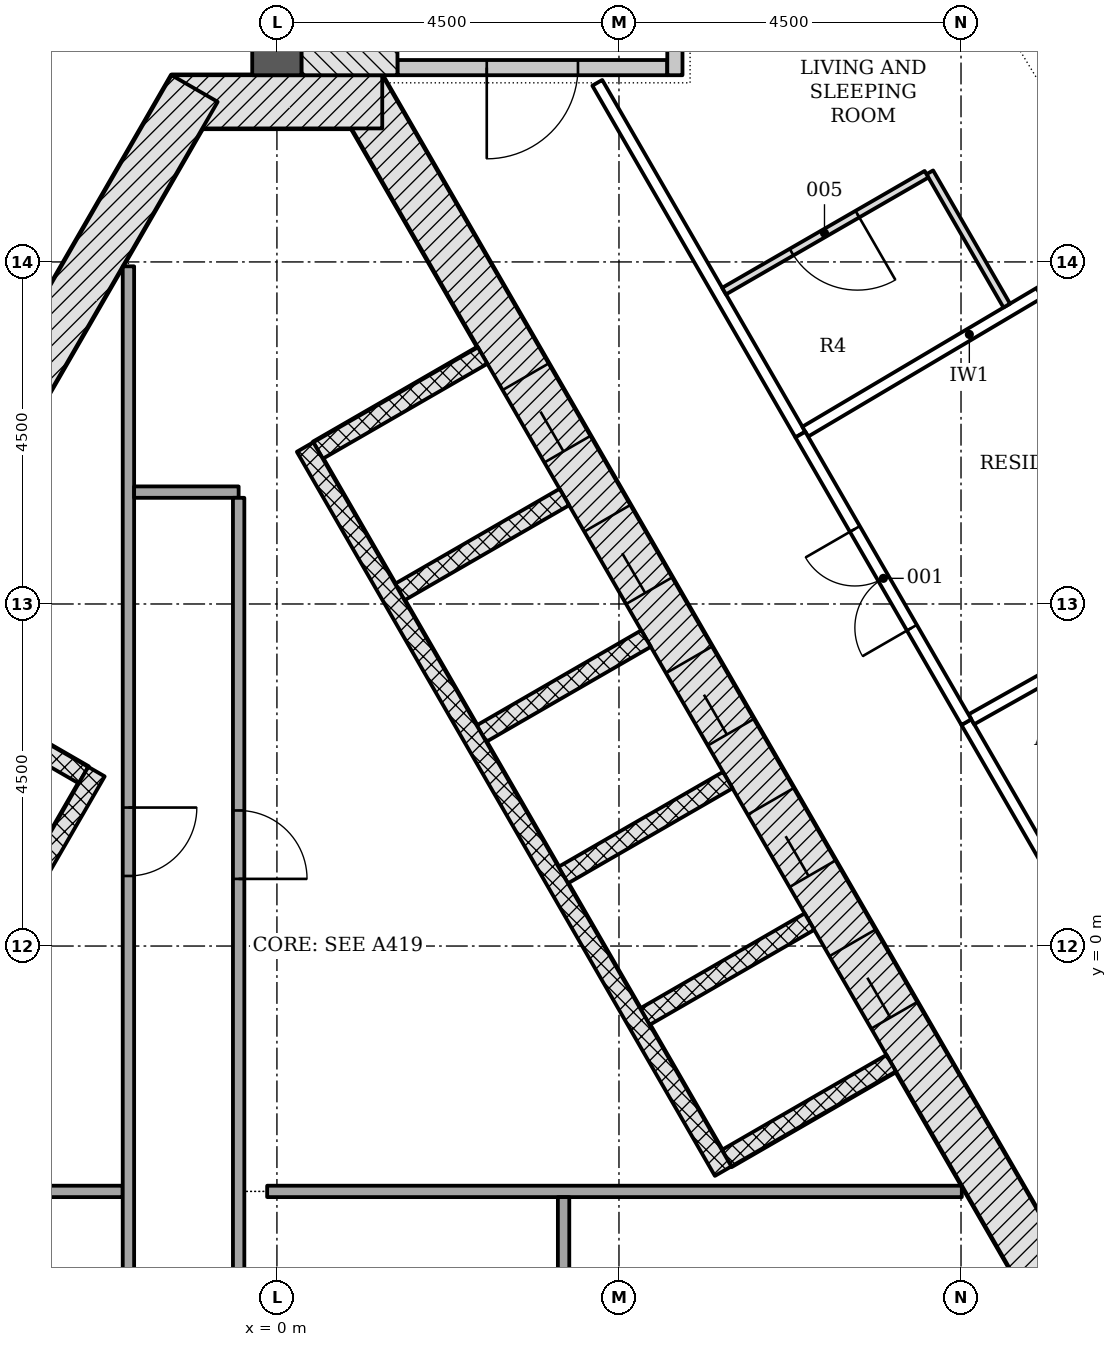
"""IFC4 building model, lengths in metres.
Left out: names, types, materials, properties, quantities, classifications, styles, units other than length and angle.
Written with IfcOpenShell. Run it as: python <this file> out.ifc"""

import sys

from ifc_helpers import new_model, si_unit, direction, frame, frame_2d, origin, place, context, subcontext, project, spatial, rectangle, extrude, element, fill, save


model = new_model("IFC4")
c1 = context("Model", 3, precision=1e-05, world=origin(), true_north=direction((0.0, 1.0)))
c2 = subcontext(c1, "Body", "Model", "MODEL_VIEW")
j1 = project(units=[si_unit("LENGTHUNIT", "METRE"), si_unit("PLANEANGLEUNIT", "RADIAN")], contexts=[c1])
p1 = place(None, origin())
s1 = spatial("IfcSite", under=j1, at=p1, CompositionType="ELEMENT")
p2 = place(p1, origin())
s2 = spatial("IfcBuilding", under=s1, at=p2, CompositionType="ELEMENT")
p3 = place(p2, frame((0.0, 0.0, 229.2)))
s3 = spatial("IfcBuildingStorey", under=s2, at=p3, CompositionType="ELEMENT", Elevation=229.2)
p4 = place(p3, frame((8.926, -6.753, -0.2), z_axis=(0.0, 0.0, 1.0), x_axis=(0.500042739161, 0.866000726912, 0.0)))
e1 = element("IfcWall", 1, at=p4, inside=s3, PredefinedType="SHEAR", context=c2, shape_type="SweptSolid", body=[
    extrude(rectangle(XDim=2.771, YDim=0.7, at=frame_2d((1.386, 0.0))), origin(), (0.0, 0.0, 1.0), 3.6),
])
p5 = place(p3, frame((10.311, -4.703, -0.2), z_axis=(0.0, 0.0, 1.0), x_axis=(-0.500001446645, 0.866024568562, 0.0)))
e2 = element("IfcWall", 2, at=p5, inside=s3, PredefinedType="SHEAR", context=c2, shape_type="SweptSolid", body=[
    extrude(rectangle(XDim=18.458, YDim=0.7, at=frame_2d((9.229, 0.0))), origin(), (0.0, 0.0, 1.0), 3.6),
])
p6 = place(p5, frame((4.379, 0.0, 0.2)))
e3 = element("IfcOpeningElement", 3, at=p6, cuts=e2, PredefinedType="OPENING", context=c2, shape_type="SweptSolid", body=[
    extrude(rectangle(XDim=1.1, YDim=2.1, at=frame_2d((0.55, 1.05))), frame((0.0, 0.36, 0.0), z_axis=(0.0, -1.0, 0.0), x_axis=(1.0, 0.0, 0.0)), (0.0, 0.0, 1.0), 0.72),
])
p7 = place(p5, frame((6.529, 0.0, 0.2)))
e4 = element("IfcOpeningElement", 4, at=p7, cuts=e2, PredefinedType="OPENING", context=c2, shape_type="SweptSolid", body=[
    extrude(rectangle(XDim=1.1, YDim=2.1, at=frame_2d((0.55, 1.05))), frame((0.0, 0.36, 0.0), z_axis=(0.0, -1.0, 0.0), x_axis=(1.0, 0.0, 0.0)), (0.0, 0.0, 1.0), 0.72),
])
p8 = place(p5, frame((8.679, 0.0, 0.2)))
e5 = element("IfcOpeningElement", 5, at=p8, cuts=e2, PredefinedType="OPENING", context=c2, shape_type="SweptSolid", body=[
    extrude(rectangle(XDim=1.1, YDim=2.1, at=frame_2d((0.55, 1.05))), frame((0.0, 0.36, 0.0), z_axis=(0.0, -1.0, 0.0), x_axis=(1.0, 0.0, 0.0)), (0.0, 0.0, 1.0), 0.72),
])
p9 = place(p5, frame((10.829, 0.0, 0.2)))
e6 = element("IfcOpeningElement", 6, at=p9, cuts=e2, PredefinedType="OPENING", context=c2, shape_type="SweptSolid", body=[
    extrude(rectangle(XDim=1.1, YDim=2.1, at=frame_2d((0.55, 1.05))), frame((0.0, 0.36, 0.0), z_axis=(0.0, -1.0, 0.0), x_axis=(1.0, 0.0, 0.0)), (0.0, 0.0, 1.0), 0.72),
])
p10 = place(p5, frame((12.979, 0.0, 0.2)))
e7 = element("IfcOpeningElement", 7, at=p10, cuts=e2, PredefinedType="OPENING", context=c2, shape_type="SweptSolid", body=[
    extrude(rectangle(XDim=1.1, YDim=2.1, at=frame_2d((0.55, 1.05))), frame((0.0, 0.36, 0.0), z_axis=(0.0, -1.0, 0.0), x_axis=(1.0, 0.0, 0.0)), (0.0, 0.0, 1.0), 0.72),
])
p11 = place(p3, frame((1.386, 11.106, -0.2), z_axis=(0.0, 0.0, 1.0), x_axis=(-1.0, 0.0, 0.0)))
e8 = element("IfcWall", 8, at=p11, inside=s3, PredefinedType="SHEAR", context=c2, shape_type="SweptSolid", body=[
    extrude(rectangle(XDim=2.771, YDim=0.7, at=frame_2d((1.386, 0.0))), origin(), (0.0, 0.0, 1.0), 3.6),
])
p12 = place(p3, frame((-1.083, 11.281, -0.2), z_axis=(0.0, 0.0, 1.0), x_axis=(-0.500001446645, -0.866024568562, 0.0)))
e9 = element("IfcWall", 9, at=p12, inside=s3, PredefinedType="SHEAR", context=c2, shape_type="SweptSolid", body=[
    extrude(rectangle(XDim=18.458, YDim=0.7, at=frame_2d((9.229, 0.0))), origin(), (0.0, 0.0, 1.0), 3.6),
])
p13 = place(p12, frame((8.979, 0.0, 0.2)))
e10 = element("IfcOpeningElement", 10, at=p13, cuts=e9, PredefinedType="OPENING", context=c2, shape_type="SweptSolid", body=[
    extrude(rectangle(XDim=1.2, YDim=2.1, at=frame_2d((0.6, 1.05))), frame((0.0, 0.36, 0.0), z_axis=(0.0, -1.0, 0.0), x_axis=(1.0, 0.0, 0.0)), (0.0, 0.0, 1.0), 0.72),
])
p14 = place(p12, frame((11.029, 0.0, 0.2)))
e11 = element("IfcOpeningElement", 11, at=p14, cuts=e9, PredefinedType="OPENING", context=c2, shape_type="SweptSolid", body=[
    extrude(rectangle(XDim=1.2, YDim=2.1, at=frame_2d((0.6, 1.05))), frame((0.0, 0.36, 0.0), z_axis=(0.0, -1.0, 0.0), x_axis=(1.0, 0.0, 0.0)), (0.0, 0.0, 1.0), 0.72),
])
p15 = place(p3, frame((0.0, 11.456, -0.2), z_axis=(0.0, 0.0, 1.0), x_axis=(0.0, 1.0, 0.0)))
e12 = element("IfcWall", 12, at=p15, inside=s3, PredefinedType="SHEAR", context=c2, shape_type="SweptSolid", body=[
    extrude(rectangle(XDim=7.507, YDim=0.65, at=frame_2d((3.753, 0.0))), origin(), (0.0, 0.0, 1.0), 3.6),
])
for number, where, z_axis, x_axis in (
    (13, (8.081, -1.541, -0.2), (0.0, 0.0, 1.0), (-0.866, -0.5, 0.0)),
    (14, (7.006, 0.321, -0.2), (0.0, 0.0, 1.0), (-0.866, -0.5, 0.0)),
):
    element("IfcWall", number, at=place(p3, frame(where, z_axis=z_axis, x_axis=x_axis)), inside=s3, PredefinedType="PARTITIONING", context=c2, shape_type="SweptSolid", body=[
        extrude(rectangle(XDim=2.5, YDim=0.25, at=frame_2d((1.25, 0.0))), origin(), (0.0, 0.0, 1.0), 3.6),
    ])
p16 = place(p3, frame((5.931, 2.183, -0.2), z_axis=(0.0, 0.0, 1.0), x_axis=(-0.866047370643, -0.499961950354, 0.0)))
e15 = element("IfcWall", 15, at=p16, inside=s3, PredefinedType="PARTITIONING", context=c2, shape_type="SweptSolid", body=[
    extrude(rectangle(XDim=2.5, YDim=0.25, at=frame_2d((1.25, 0.0))), origin(), (0.0, 0.0, 1.0), 3.6),
])
for number, where, z_axis, x_axis in (
    (16, (4.856, 4.045, -0.2), (0.0, 0.0, 1.0), (-0.866, -0.5, 0.0)),
    (17, (3.781, 5.907, -0.2), (0.0, 0.0, 1.0), (-0.866, -0.5, 0.0)),
    (18, (2.706, 7.769, -0.2), (0.0, 0.0, 1.0), (-0.866, -0.5, 0.0)),
):
    element("IfcWall", number, at=place(p3, frame(where, z_axis=z_axis, x_axis=x_axis)), inside=s3, PredefinedType="PARTITIONING", context=c2, shape_type="SweptSolid", body=[
        extrude(rectangle(XDim=2.5, YDim=0.25, at=frame_2d((1.25, 0.0))), origin(), (0.0, 0.0, 1.0), 3.6),
    ])
p17 = place(p3, frame((5.87, -2.961, 0.0), z_axis=(0.0, 0.0, 1.0), x_axis=(-0.50000615651, 0.866021849293, 0.0)))
e19 = element("IfcWall", 19, at=p17, inside=s3, PredefinedType="PARTITIONING", context=c2, shape_type="SweptSolid", body=[
    extrude(rectangle(XDim=11.0, YDim=0.25, at=frame_2d((5.5, 0.0))), origin(), (0.0, 0.0, 1.0), 3.4),
])
p18 = place(p3, frame((-5.056, 3.699, -0.2), z_axis=(0.0, 0.0, 1.0), x_axis=(0.866032775405, -0.499987231761, 0.0)))
e20 = element("IfcWall", 20, at=p18, inside=s3, PredefinedType="PARTITIONING", context=c2, shape_type="SweptSolid", body=[
    extrude(rectangle(XDim=2.9, YDim=0.25, at=frame_2d((1.45, 0.0))), origin(), (0.0, 0.0, 1.0), 3.6),
])
p19 = place(p3, frame((-2.374, 2.294, 0.0), z_axis=(0.0, 0.0, 1.0), x_axis=(-0.500003174267, -0.866023571113, 0.0)))
e21 = element("IfcWall", 21, at=p19, inside=s3, PredefinedType="PARTITIONING", context=c2, shape_type="SweptSolid", body=[
    extrude(rectangle(XDim=6.7, YDim=0.25, at=frame_2d((3.35, 0.0))), origin(), (0.0, 0.0, 1.0), 3.4),
])
p20 = place(p3, frame((-5.373, -3.228, 0.0), z_axis=(0.0, 0.0, 1.0), x_axis=(1.0, 0.0, 0.0)))
e22 = element("IfcWall", 22, at=p20, inside=s3, PredefinedType="PARTITIONING", context=c2, shape_type="SweptSolid", body=[
    extrude(rectangle(XDim=3.344, YDim=0.15, at=frame_2d((1.672, 0.0))), origin(), (0.0, 0.0, 1.0), 3.4),
])
p21 = place(p3, frame((-1.954, 8.942, 0.0), z_axis=(0.0, 0.0, 1.0), x_axis=(0.0, -1.0, 0.0)))
e23 = element("IfcWall", 23, at=p21, inside=s3, PredefinedType="PARTITIONING", context=c2, shape_type="SweptSolid", body=[
    extrude(rectangle(XDim=15.171, YDim=0.15, at=frame_2d((7.585, 0.0))), origin(), (0.0, 0.0, 1.0), 3.4),
])
p22 = place(p21, frame((7.121, 0.0, 0.0)))
e24 = element("IfcOpeningElement", 24, at=p22, cuts=e23, PredefinedType="OPENING", context=c2, shape_type="SweptSolid", body=[
    extrude(rectangle(XDim=0.9, YDim=2.1, at=frame_2d((0.45, 1.05))), frame((0.0, 0.085, 0.0), z_axis=(0.0, -1.0, 0.0), x_axis=(1.0, 0.0, 0.0)), (0.0, 0.0, 1.0), 0.17),
])
p23 = place(p3, frame((-1.879, 5.972, 0.0), z_axis=(0.0, 0.0, 1.0), x_axis=(1.0, 0.0, 0.0)))
e25 = element("IfcWall", 25, at=p23, inside=s3, PredefinedType="PARTITIONING", context=c2, shape_type="SweptSolid", body=[
    extrude(rectangle(XDim=1.375, YDim=0.15, at=frame_2d((0.688, 0.0))), origin(), (0.0, 0.0, 1.0), 3.4),
])
p24 = place(p3, frame((-0.504, 5.897, 0.0), z_axis=(0.0, 0.0, 1.0), x_axis=(0.0, -1.0, 0.0)))
e26 = element("IfcWall", 26, at=p24, inside=s3, PredefinedType="PARTITIONING", context=c2, shape_type="SweptSolid", body=[
    extrude(rectangle(XDim=12.125, YDim=0.15, at=frame_2d((6.062, 0.0))), origin(), (0.0, 0.0, 1.0), 3.4),
])
p25 = place(p24, frame((4.114, 0.0, 0.0)))
e27 = element("IfcOpeningElement", 27, at=p25, cuts=e26, PredefinedType="OPENING", context=c2, shape_type="SweptSolid", body=[
    extrude(rectangle(XDim=0.9, YDim=2.1, at=frame_2d((0.45, 1.05))), frame((0.0, 0.085, 0.0), z_axis=(0.0, -1.0, 0.0), x_axis=(1.0, 0.0, 0.0)), (0.0, 0.0, 1.0), 0.17),
])
p26 = place(p3, frame((-0.129, -3.228, 0.0), z_axis=(0.0, 0.0, 1.0), x_axis=(1.0, 0.0, 0.0)))
e28 = element("IfcWall", 28, at=p26, inside=s3, PredefinedType="PARTITIONING", context=c2, shape_type="SweptSolid", body=[
    extrude(rectangle(XDim=9.139, YDim=0.15, at=frame_2d((4.57, 0.0))), origin(), (0.0, 0.0, 1.0), 3.4),
])
p27 = place(p3, frame((3.771, -3.303, 0.0), z_axis=(0.0, 0.0, 1.0), x_axis=(0.0, -1.0, 0.0)))
e29 = element("IfcWall", 29, at=p27, inside=s3, PredefinedType="PARTITIONING", context=c2, shape_type="SweptSolid", body=[
    extrude(rectangle(XDim=2.925, YDim=0.15, at=frame_2d((1.462, 0.0))), origin(), (0.0, 0.0, 1.0), 3.4),
])
p28 = place(p3, frame((5.135, 11.556, -0.2), z_axis=(0.0, 0.0, 1.0), x_axis=(-1.0, 0.0, 0.0)))
e30 = element("IfcWall", 30, at=p28, inside=s3, PredefinedType="SHEAR", context=c2, shape_type="SweptSolid", body=[
    extrude(rectangle(XDim=3.55, YDim=0.2, at=frame_2d((1.775, 0.0))), origin(), (0.0, 0.0, 1.0), 3.6),
])
p29 = place(p28, frame((1.175, 0.0, 0.2)))
e31 = element("IfcOpeningElement", 31, at=p29, cuts=e30, PredefinedType="OPENING", context=c2, shape_type="SweptSolid", body=[
    extrude(rectangle(XDim=1.2, YDim=2.1, at=frame_2d((0.6, 1.05))), frame((0.0, 0.11, 0.0), z_axis=(0.0, -1.0, 0.0), x_axis=(1.0, 0.0, 0.0)), (0.0, 0.0, 1.0), 0.22),
])
p30 = place(p3, frame((5.236, 11.456, -0.2), z_axis=(0.0, 0.0, 1.0), x_axis=(0.0, 1.0, 0.0)))
e32 = element("IfcWall", 32, at=p30, inside=s3, PredefinedType="SHEAR", context=c2, shape_type="SweptSolid", body=[
    extrude(rectangle(XDim=5.6, YDim=0.2, at=frame_2d((2.8, 0.0))), origin(), (0.0, 0.0, 1.0), 3.6),
])
p31 = place(p30, frame((0.45, 0.0, 0.2)))
e33 = element("IfcOpeningElement", 33, at=p31, cuts=e32, PredefinedType="OPENING", context=c2, shape_type="SweptSolid", body=[
    extrude(rectangle(XDim=1.2, YDim=2.1, at=frame_2d((0.6, 1.05))), frame((0.0, 0.11, 0.0), z_axis=(0.0, -1.0, 0.0), x_axis=(1.0, 0.0, 0.0)), (0.0, 0.0, 1.0), 0.22),
])
p32 = place(p3, frame((0.955, 11.456, -0.2), z_axis=(0.0, 0.0, 1.0), x_axis=(0.0, 1.0, 0.0)))
e34 = element("IfcWall", 34, at=p32, inside=s3, PredefinedType="SHEAR", context=c2, shape_type="SweptSolid", body=[
    extrude(rectangle(XDim=7.507, YDim=1.261, at=frame_2d((3.753, 0.0))), origin(), (0.0, 0.0, 1.0), 3.6),
])
p33 = place(p3, frame((15.832, -8.765, 0.0), z_axis=(0.0, 0.0, 1.0), x_axis=(-0.500008967739, 0.866020226196, 0.0)))
e35 = element("IfcWall", 35, at=p33, inside=s3, PredefinedType="PARTITIONING", context=c2, shape_type="SweptSolid", body=[
    extrude(rectangle(XDim=13.523, YDim=0.15, at=frame_2d((6.761, 0.0))), origin(), (0.0, 0.0, 1.0), 2.852),
])
p34 = place(p3, frame((6.886, 6.729, 0.0), z_axis=(0.0, 0.0, 1.0), x_axis=(-0.4999966759, 0.866027322946, 0.0)))
e36 = element("IfcWall", 36, at=p34, inside=s3, PredefinedType="PARTITIONING", context=c2, shape_type="SweptSolid", body=[
    extrude(rectangle(XDim=5.343, YDim=0.15, at=frame_2d((2.672, 0.0))), origin(), (0.0, 0.0, 1.0), 2.852),
])
p35 = place(p3, frame((13.514, 5.444, 0.0), z_axis=(0.0, 0.0, 1.0), x_axis=(-0.871644326388, -0.490138927525, 0.0)))
e37 = element("IfcWall", 37, at=p35, inside=s3, PredefinedType="PARTITIONING", context=c2, shape_type="SweptSolid", body=[
    extrude(rectangle(XDim=5.023, YDim=0.15, at=frame_2d((2.511, 0.0))), origin(), (0.0, 0.0, 1.0), 3.4),
])
p36 = place(p35, frame((2.049, 0.0, 0.0)))
e38 = element("IfcOpeningElement", 38, at=p36, cuts=e37, PredefinedType="OPENING", context=c2, shape_type="SweptSolid", body=[
    extrude(rectangle(XDim=1.0, YDim=2.1, at=frame_2d((0.5, 1.05))), frame((0.0, 0.085, 0.0), z_axis=(0.0, -1.0, 0.0), x_axis=(1.0, 0.0, 0.0)), (0.0, 0.0, 1.0), 0.17),
])
p37 = place(p3, frame((11.268, 9.325, 0.0), z_axis=(0.0, 0.0, 1.0), x_axis=(-0.860287582295, -0.509809058128, 0.0)))
e39 = element("IfcWall", 39, at=p37, inside=s3, PredefinedType="PARTITIONING", context=c2, shape_type="SweptSolid", body=[
    extrude(rectangle(XDim=5.018, YDim=0.15, at=frame_2d((2.509, 0.0))), origin(), (0.0, 0.0, 1.0), 3.4),
])
p38 = place(p37, frame((0.447, 0.0, 0.0)))
e40 = element("IfcOpeningElement", 40, at=p38, cuts=e39, PredefinedType="OPENING", context=c2, shape_type="SweptSolid", body=[
    extrude(rectangle(XDim=1.0, YDim=2.1, at=frame_2d((0.5, 1.05))), frame((0.0, 0.085, 0.0), z_axis=(0.0, -1.0, 0.0), x_axis=(1.0, 0.0, 0.0)), (0.0, 0.0, 1.0), 0.17),
])
p39 = place(p3, frame((9.071, 2.946, 0.0), z_axis=(0.0, 0.0, 1.0), x_axis=(-0.499991738058, 0.866030173766, 0.0)))
e41 = element("IfcWall", 41, at=p39, inside=s3, PredefinedType="PARTITIONING", context=c2, shape_type="SweptSolid", body=[
    extrude(rectangle(XDim=4.369, YDim=0.15, at=frame_2d((2.184, 0.0))), origin(), (0.0, 0.0, 1.0), 2.852),
])
p40 = place(p39, frame((1.434, 0.0, 0.0)))
e42 = element("IfcOpeningElement", 42, at=p40, cuts=e41, PredefinedType="OPENING", context=c2, shape_type="SweptSolid", body=[
    extrude(rectangle(XDim=1.5, YDim=2.1, at=frame_2d((0.75, 1.05))), frame((0.0, 0.085, 0.0), z_axis=(0.0, -1.0, 0.0), x_axis=(1.0, 0.0, 0.0)), (0.0, 0.0, 1.0), 0.17),
])
p41 = place(p3, frame((9.602, 8.425, 0.0), z_axis=(0.0, 0.0, 1.0), x_axis=(-0.500080744026, 0.86597878118, 0.0)))
e43 = element("IfcWall", 43, at=p41, inside=s3, PredefinedType="PARTITIONING", context=c2, shape_type="SweptSolid", body=[
    extrude(rectangle(XDim=2.025, YDim=0.1, at=frame_2d((1.013, 0.0))), origin(), (0.0, 0.0, 1.0), 3.4),
])
p42 = place(p3, frame((8.546, 10.154, 0.0), z_axis=(0.0, 0.0, 1.0), x_axis=(-0.866016353143, -0.500015675843, 0.0)))
e44 = element("IfcWall", 44, at=p42, inside=s3, PredefinedType="PARTITIONING", context=c2, shape_type="SweptSolid", body=[
    extrude(rectangle(XDim=3.075, YDim=0.1, at=frame_2d((1.538, 0.0))), origin(), (0.0, 0.0, 1.0), 3.4),
])
p43 = place(p42, frame((1.05, 0.0, 0.0)))
e45 = element("IfcOpeningElement", 45, at=p43, cuts=e44, PredefinedType="OPENING", context=c2, shape_type="SweptSolid", body=[
    extrude(rectangle(XDim=1.0, YDim=2.1, at=frame_2d((0.5, 1.05))), frame((0.0, 0.06, 0.0), z_axis=(0.0, -1.0, 0.0), x_axis=(1.0, 0.0, 0.0)), (0.0, 0.0, 1.0), 0.12),
])
p44 = place(p3, frame((-0.545, 18.513, 0.0), z_axis=(0.0, 0.0, 1.0), x_axis=(-0.499998165157, -0.866026463129, 0.0)))
e46 = element("IfcWall", 46, at=p44, inside=s3, PredefinedType="PARTITIONING", context=c2, shape_type="SweptSolid", body=[
    extrude(rectangle(XDim=13.771, YDim=0.15, at=frame_2d((6.886, 0.0))), origin(), (0.0, 0.0, 1.0), 2.852),
])
p45 = place(p6, origin())
e47 = element("IfcDoor", 47, at=p45, inside=s3, OperationType="DOUBLE_DOOR_SLIDING", PredefinedType="DOOR", context=c2, shape_type="SweptSolid", body=[
    extrude(rectangle(XDim=1.1, YDim=2.1, at=frame_2d((0.55, 1.05))), frame((0.0, 0.025, 0.0), z_axis=(0.0, -1.0, 0.0), x_axis=(1.0, 0.0, 0.0)), (0.0, 0.0, 1.0), 0.05),
])
fill(e3, e47)
p46 = place(p7, origin())
e48 = element("IfcDoor", 48, at=p46, inside=s3, OperationType="DOUBLE_DOOR_SLIDING", PredefinedType="DOOR", context=c2, shape_type="SweptSolid", body=[
    extrude(rectangle(XDim=1.1, YDim=2.1, at=frame_2d((0.55, 1.05))), frame((0.0, 0.025, 0.0), z_axis=(0.0, -1.0, 0.0), x_axis=(1.0, 0.0, 0.0)), (0.0, 0.0, 1.0), 0.05),
])
fill(e4, e48)
p47 = place(p8, origin())
e49 = element("IfcDoor", 49, at=p47, inside=s3, OperationType="DOUBLE_DOOR_SLIDING", PredefinedType="DOOR", context=c2, shape_type="SweptSolid", body=[
    extrude(rectangle(XDim=1.1, YDim=2.1, at=frame_2d((0.55, 1.05))), frame((0.0, 0.025, 0.0), z_axis=(0.0, -1.0, 0.0), x_axis=(1.0, 0.0, 0.0)), (0.0, 0.0, 1.0), 0.05),
])
fill(e5, e49)
p48 = place(p9, origin())
e50 = element("IfcDoor", 50, at=p48, inside=s3, OperationType="DOUBLE_DOOR_SLIDING", PredefinedType="DOOR", context=c2, shape_type="SweptSolid", body=[
    extrude(rectangle(XDim=1.1, YDim=2.1, at=frame_2d((0.55, 1.05))), frame((0.0, 0.025, 0.0), z_axis=(0.0, -1.0, 0.0), x_axis=(1.0, 0.0, 0.0)), (0.0, 0.0, 1.0), 0.05),
])
fill(e6, e50)
p49 = place(p10, origin())
e51 = element("IfcDoor", 51, at=p49, inside=s3, OperationType="DOUBLE_DOOR_SLIDING", PredefinedType="DOOR", context=c2, shape_type="SweptSolid", body=[
    extrude(rectangle(XDim=1.1, YDim=2.1, at=frame_2d((0.55, 1.05))), frame((0.0, 0.025, 0.0), z_axis=(0.0, -1.0, 0.0), x_axis=(1.0, 0.0, 0.0)), (0.0, 0.0, 1.0), 0.05),
])
fill(e7, e51)
p50 = place(p22, origin())
e52 = element("IfcDoor", 52, at=p50, inside=s3, OperationType="SINGLE_SWING_LEFT", PredefinedType="DOOR", context=c2, shape_type="SweptSolid", body=[
    extrude(rectangle(XDim=0.9, YDim=2.1, at=frame_2d((0.45, 1.05))), frame((0.0, 0.025, 0.0), z_axis=(0.0, -1.0, 0.0), x_axis=(1.0, 0.0, 0.0)), (0.0, 0.0, 1.0), 0.05),
])
fill(e24, e52)
p51 = place(p25, origin())
e53 = element("IfcDoor", 53, at=p51, inside=s3, OperationType="SINGLE_SWING_RIGHT", PredefinedType="DOOR", context=c2, shape_type="SweptSolid", body=[
    extrude(rectangle(XDim=0.9, YDim=2.1, at=frame_2d((0.45, 1.05))), frame((0.0, 0.025, 0.0), z_axis=(0.0, -1.0, 0.0), x_axis=(1.0, 0.0, 0.0)), (0.0, 0.0, 1.0), 0.05),
])
fill(e27, e53)
p52 = place(p29, origin())
e54 = element("IfcDoor", 54, at=p52, inside=s3, OperationType="SINGLE_SWING_RIGHT", PredefinedType="DOOR", context=c2, shape_type="SweptSolid", body=[
    extrude(rectangle(XDim=1.2, YDim=2.1, at=frame_2d((0.6, 1.05))), frame((0.0, 0.025, 0.0), z_axis=(0.0, -1.0, 0.0), x_axis=(1.0, 0.0, 0.0)), (0.0, 0.0, 1.0), 0.05),
])
fill(e31, e54)
p53 = place(p40, origin())
e55 = element("IfcDoor", 55, at=p53, inside=s3, OperationType="DOUBLE_DOOR_SINGLE_SWING", PredefinedType="DOOR", context=c2, shape_type="SweptSolid", body=[
    extrude(rectangle(XDim=1.5, YDim=2.1, at=frame_2d((0.75, 1.05))), frame((0.0, 0.025, 0.0), z_axis=(0.0, -1.0, 0.0), x_axis=(1.0, 0.0, 0.0)), (0.0, 0.0, 1.0), 0.05),
])
fill(e42, e55)
p54 = place(p43, origin())
e56 = element("IfcDoor", 56, at=p54, inside=s3, OperationType="SINGLE_SWING_LEFT", PredefinedType="DOOR", context=c2, shape_type="SweptSolid", body=[
    extrude(rectangle(XDim=1.0, YDim=2.1, at=frame_2d((0.5, 1.05))), frame((0.0, 0.025, 0.0), z_axis=(0.0, -1.0, 0.0), x_axis=(1.0, 0.0, 0.0)), (0.0, 0.0, 1.0), 0.05),
])
fill(e45, e56)
p55 = place(p38, origin())
e57 = element("IfcDoor", 57, at=p55, inside=s3, OperationType="SINGLE_SWING_RIGHT", PredefinedType="DOOR", context=c2, shape_type="SweptSolid", body=[
    extrude(rectangle(XDim=1.0, YDim=2.1, at=frame_2d((0.5, 1.05))), frame((0.0, 0.025, 0.0), z_axis=(0.0, -1.0, 0.0), x_axis=(1.0, 0.0, 0.0)), (0.0, 0.0, 1.0), 0.05),
])
fill(e40, e57)
save(model, sys.argv[1])
